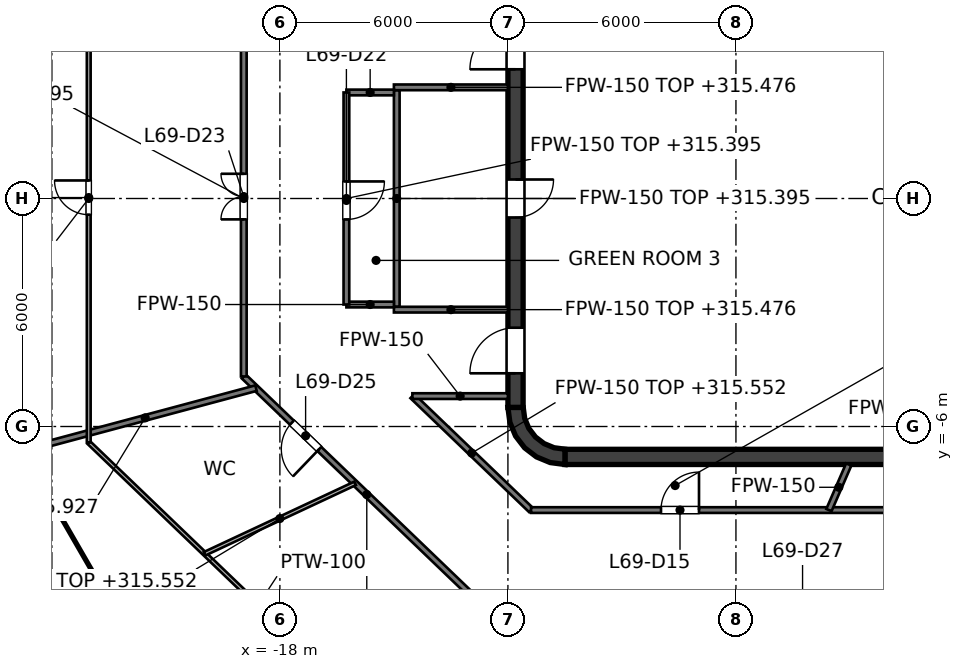
"""IFC4 building model, lengths in metres.
Left out: names, types, materials, properties, quantities, classifications, styles, units other than length and angle.
Written with IfcOpenShell. Run it as: python <this file> out.ifc"""

import sys

from ifc_helpers import new_model, si_unit, direction, frame, frame_2d, origin, place, context, subcontext, project, spatial, polyline, rectangle, outline, extrude, element, fill, save


model = new_model("IFC4")
c1 = context("Model", 3, precision=1e-05, world=origin(), true_north=direction((0.0, 1.0)))
c2 = subcontext(c1, "Body", "Model", "MODEL_VIEW")
j1 = project(units=[si_unit("LENGTHUNIT", "METRE"), si_unit("PLANEANGLEUNIT", "RADIAN")], contexts=[c1])
p1 = place(None, origin())
s1 = spatial("IfcSite", under=j1, at=p1, CompositionType="ELEMENT")
p2 = place(p1, origin())
s2 = spatial("IfcBuilding", under=s1, at=p2, CompositionType="ELEMENT")
p3 = place(p2, frame((0.0, 0.0, 312.4)))
s3 = spatial("IfcBuildingStorey", under=s2, at=p3, CompositionType="ELEMENT", Elevation=312.4)
p4 = place(p3, frame((-10.5, -6.8, 0.0), z_axis=(0.0, 0.0, 1.0), x_axis=(1.0, 0.0, 0.0)))
e1 = element("IfcWall", 1, at=p4, inside=s3, PredefinedType="SHEAR", context=c2, shape_type="SweptSolid", body=[
    extrude(rectangle(XDim=21.0, YDim=0.4, at=frame_2d((10.5, 0.0))), origin(), (0.0, 0.0, 1.0), 4.0),
])
p5 = place(p3, frame((-11.8, -5.5, 0.0), z_axis=(0.0, 0.0, 1.0), x_axis=(0.0, 1.0, 0.0)))
e2 = element("IfcWall", 2, at=p5, inside=s3, PredefinedType="SHEAR", context=c2, shape_type="SweptSolid", body=[
    extrude(rectangle(XDim=11.0, YDim=0.4, at=frame_2d((5.5, 0.0))), origin(), (0.0, 0.0, 1.0), 4.0),
])
p6 = place(p5, frame((5.0, 0.0, 0.0)))
e3 = element("IfcOpeningElement", 3, at=p6, cuts=e2, PredefinedType="OPENING", context=c2, shape_type="SweptSolid", body=[
    extrude(rectangle(XDim=1.0, YDim=2.1, at=frame_2d((0.5, 1.05))), frame((0.0, 0.2, 0.0), z_axis=(0.0, -1.0, 0.0), x_axis=(1.0, 0.0, 0.0)), (0.0, 0.0, 1.0), 0.4),
])
p7 = place(p5, frame((0.9, 0.0, 0.0)))
e4 = element("IfcOpeningElement", 4, at=p7, cuts=e2, PredefinedType="OPENING", context=c2, shape_type="SweptSolid", body=[
    extrude(rectangle(XDim=1.2, YDim=2.1, at=frame_2d((0.6, 1.05))), frame((0.0, 0.2, 0.0), z_axis=(0.0, -1.0, 0.0), x_axis=(1.0, 0.0, 0.0)), (0.0, 0.0, 1.0), 0.4),
])
p8 = place(p5, frame((8.9, 0.0, 0.0)))
e5 = element("IfcOpeningElement", 5, at=p8, cuts=e2, PredefinedType="OPENING", context=c2, shape_type="SweptSolid", body=[
    extrude(rectangle(XDim=1.2, YDim=2.1, at=frame_2d((0.6, 1.05))), frame((0.0, 0.2, 0.0), z_axis=(0.0, -1.0, 0.0), x_axis=(1.0, 0.0, 0.0)), (0.0, 0.0, 1.0), 0.4),
])
p9 = place(p3, origin())
e6 = element("IfcWall", 6, at=p9, inside=s3, PredefinedType="SHEAR", context=c2, shape_type="SweptSolid", body=[
    extrude(outline(polyline([(-10.5, -7.0), (-10.5, -6.596), (-10.784, -6.559), (-11.048, -6.45), (-11.275, -6.275), (-11.45, -6.048), (-11.559, -5.784), (-11.596, -5.5), (-12.0, -5.5), (-11.949, -5.888), (-11.799, -6.25), (-11.561, -6.561), (-11.25, -6.799), (-10.888, -6.949), (-10.5, -7.0)])), origin(), (0.0, 0.0, 1.0), 4.0),
])
p10 = place(p3, frame((-9.0, -6.6, 0.0), z_axis=(0.0, 0.0, 1.0), x_axis=(0.0, 1.0, 0.0)))
e7 = element("IfcWall", 7, at=p10, inside=s3, PredefinedType="PARTITIONING", context=c2, shape_type="SweptSolid", body=[
    extrude(rectangle(XDim=2.5, YDim=0.25, at=frame_2d((1.25, 0.0))), origin(), (0.0, 0.0, 1.0), 3.85),
])
p11 = place(p10, frame((0.75, 0.0, 0.0)))
e8 = element("IfcOpeningElement", 8, at=p11, cuts=e7, PredefinedType="OPENING", context=c2, shape_type="SweptSolid", body=[
    extrude(rectangle(XDim=1.0, YDim=2.1, at=frame_2d((0.5, 1.05))), frame((0.0, 0.125, 0.0), z_axis=(0.0, -1.0, 0.0), x_axis=(1.0, 0.0, 0.0)), (0.0, 0.0, 1.0), 0.25),
])
p12 = place(p3, frame((-2.9, -6.6, 0.0), z_axis=(0.0, 0.0, 1.0), x_axis=(0.0, 1.0, 0.0)))
e9 = element("IfcWall", 9, at=p12, inside=s3, PredefinedType="PARTITIONING", context=c2, shape_type="SweptSolid", body=[
    extrude(rectangle(XDim=2.5, YDim=0.25, at=frame_2d((1.25, 0.0))), origin(), (0.0, 0.0, 1.0), 3.85),
])
p13 = place(p12, frame((0.8, 0.0, 0.0)))
e10 = element("IfcOpeningElement", 10, at=p13, cuts=e9, PredefinedType="OPENING", context=c2, shape_type="SweptSolid", body=[
    extrude(rectangle(XDim=0.9, YDim=2.1, at=frame_2d((0.45, 1.05))), frame((0.0, 0.125, 0.0), z_axis=(0.0, -1.0, 0.0), x_axis=(1.0, 0.0, 0.0)), (0.0, 0.0, 1.0), 0.25),
])
p14 = place(p3, frame((-9.125, 1.525, 0.0), z_axis=(0.0, 0.0, 1.0), x_axis=(1.0, 0.0, 0.0)))
e11 = element("IfcWall", 11, at=p14, inside=s3, PredefinedType="SOLIDWALL", context=c2, shape_type="SweptSolid", body=[
    extrude(rectangle(XDim=8.35, YDim=0.25, at=frame_2d((4.175, 0.0))), origin(), (0.0, 0.0, 1.0), 3.85),
])
p15 = place(p14, frame((0.925, 0.0, 0.0)))
e12 = element("IfcOpeningElement", 12, at=p15, cuts=e11, PredefinedType="OPENING", context=c2, shape_type="SweptSolid", body=[
    extrude(rectangle(XDim=1.1, YDim=2.1, at=frame_2d((0.55, 1.05))), frame((0.0, 0.125, 0.0), z_axis=(0.0, -1.0, 0.0), x_axis=(1.0, 0.0, 0.0)), (0.0, 0.0, 1.0), 0.25),
])
p16 = place(p14, frame((3.625, 0.0, 0.0)))
e13 = element("IfcOpeningElement", 13, at=p16, cuts=e11, PredefinedType="OPENING", context=c2, shape_type="SweptSolid", body=[
    extrude(rectangle(XDim=1.1, YDim=2.1, at=frame_2d((0.55, 1.05))), frame((0.0, 0.125, 0.0), z_axis=(0.0, -1.0, 0.0), x_axis=(1.0, 0.0, 0.0)), (0.0, 0.0, 1.0), 0.25),
])
p17 = place(p14, frame((6.325, 0.0, 0.0)))
e14 = element("IfcOpeningElement", 14, at=p17, cuts=e11, PredefinedType="OPENING", context=c2, shape_type="SweptSolid", body=[
    extrude(rectangle(XDim=1.1, YDim=2.1, at=frame_2d((0.55, 1.05))), frame((0.0, 0.125, 0.0), z_axis=(0.0, -1.0, 0.0), x_axis=(1.0, 0.0, 0.0)), (0.0, 0.0, 1.0), 0.25),
])
for number, where, z_axis, x_axis in (
    (15, (-9.0, 1.65, 0.0), (0.0, 0.0, 1.0), (0.0, 1.0, 0.0)),
    (16, (-6.3, 1.65, 0.0), (0.0, 0.0, 1.0), (0.0, 1.0, 0.0)),
    (17, (-3.6, 1.65, 0.0), (0.0, 0.0, 1.0), (0.0, 1.0, 0.0)),
):
    element("IfcWall", number, at=place(p3, frame(where, z_axis=z_axis, x_axis=x_axis)), inside=s3, PredefinedType="SOLIDWALL", context=c2, shape_type="SweptSolid", body=[
        extrude(rectangle(XDim=2.2, YDim=0.25, at=frame_2d((1.1, 0.0))), origin(), (0.0, 0.0, 1.0), 3.85),
    ])
p18 = place(p3, frame((-9.125, -1.525, 0.0), z_axis=(0.0, 0.0, 1.0), x_axis=(1.0, 0.0, 0.0)))
e18 = element("IfcWall", 18, at=p18, inside=s3, PredefinedType="SOLIDWALL", context=c2, shape_type="SweptSolid", body=[
    extrude(rectangle(XDim=18.25, YDim=0.25, at=frame_2d((9.125, 0.0))), origin(), (0.0, 0.0, 1.0), 3.85),
])
p19 = place(p18, frame((7.15, 0.0, 0.0)))
e19 = element("IfcOpeningElement", 19, at=p19, cuts=e18, PredefinedType="OPENING", context=c2, shape_type="SweptSolid", body=[
    extrude(rectangle(XDim=1.2, YDim=2.1, at=frame_2d((0.6, 1.05))), frame((0.0, 0.125, 0.0), z_axis=(0.0, -1.0, 0.0), x_axis=(1.0, 0.0, 0.0)), (0.0, 0.0, 1.0), 0.25),
])
p20 = place(p18, frame((10.2, 0.0, 0.0)))
e20 = element("IfcOpeningElement", 20, at=p20, cuts=e18, PredefinedType="OPENING", context=c2, shape_type="SweptSolid", body=[
    extrude(rectangle(XDim=1.2, YDim=2.1, at=frame_2d((0.6, 1.05))), frame((0.0, 0.125, 0.0), z_axis=(0.0, -1.0, 0.0), x_axis=(1.0, 0.0, 0.0)), (0.0, 0.0, 1.0), 0.25),
])
p21 = place(p18, frame((16.075, 0.0, 0.0)))
e21 = element("IfcOpeningElement", 21, at=p21, cuts=e18, PredefinedType="OPENING", context=c2, shape_type="SweptSolid", body=[
    extrude(rectangle(XDim=1.0, YDim=2.1, at=frame_2d((0.5, 1.05))), frame((0.0, 0.125, 0.0), z_axis=(0.0, -1.0, 0.0), x_axis=(1.0, 0.0, 0.0)), (0.0, 0.0, 1.0), 0.25),
])
p22 = place(p3, frame((-9.125, -3.975, 0.0), z_axis=(0.0, 0.0, 1.0), x_axis=(1.0, 0.0, 0.0)))
e22 = element("IfcWall", 22, at=p22, inside=s3, PredefinedType="SOLIDWALL", context=c2, shape_type="SweptSolid", body=[
    extrude(rectangle(XDim=12.4, YDim=0.25, at=frame_2d((6.2, 0.0))), origin(), (0.0, 0.0, 1.0), 3.85),
])
p23 = place(p22, frame((1.05, 0.0, 0.0)))
e23 = element("IfcOpeningElement", 23, at=p23, cuts=e22, PredefinedType="OPENING", context=c2, shape_type="SweptSolid", body=[
    extrude(rectangle(XDim=1.2, YDim=2.1, at=frame_2d((0.6, 1.05))), frame((0.0, 0.125, 0.0), z_axis=(0.0, -1.0, 0.0), x_axis=(1.0, 0.0, 0.0)), (0.0, 0.0, 1.0), 0.25),
])
p24 = place(p22, frame((4.1, 0.0, 0.0)))
e24 = element("IfcOpeningElement", 24, at=p24, cuts=e22, PredefinedType="OPENING", context=c2, shape_type="SweptSolid", body=[
    extrude(rectangle(XDim=1.2, YDim=2.1, at=frame_2d((0.6, 1.05))), frame((0.0, 0.125, 0.0), z_axis=(0.0, -1.0, 0.0), x_axis=(1.0, 0.0, 0.0)), (0.0, 0.0, 1.0), 0.25),
])
for number, where, z_axis, x_axis in (
    (25, (-9.0, -3.85, 0.0), (0.0, 0.0, 1.0), (0.0, 1.0, 0.0)),
    (26, (-5.95, -3.85, 0.0), (0.0, 0.0, 1.0), (0.0, 1.0, 0.0)),
    (27, (-2.9, -3.85, 0.0), (0.0, 0.0, 1.0), (0.0, 1.0, 0.0)),
):
    element("IfcWall", number, at=place(p3, frame(where, z_axis=z_axis, x_axis=x_axis)), inside=s3, PredefinedType="SOLIDWALL", context=c2, shape_type="SweptSolid", body=[
        extrude(rectangle(XDim=2.2, YDim=0.25, at=frame_2d((1.1, 0.0))), origin(), (0.0, 0.0, 1.0), 3.85),
    ])
p25 = place(p3, frame((-14.925, -2.85, 0.0), z_axis=(0.0, 0.0, 1.0), x_axis=(0.0, 1.0, 0.0)))
e28 = element("IfcWall", 28, at=p25, inside=s3, PredefinedType="PARTITIONING", context=c2, shape_type="SweptSolid", body=[
    extrude(rectangle(XDim=5.7, YDim=0.15, at=frame_2d((2.85, 0.0))), origin(), (0.0, 0.0, 1.0), 2.995),
])
for number, where, z_axis, x_axis in (
    (29, (-15.0, 2.925, 0.0), (0.0, 0.0, 1.0), (1.0, 0.0, 0.0)),
    (30, (-15.0, -2.925, 0.0), (0.0, 0.0, 1.0), (1.0, 0.0, 0.0)),
):
    element("IfcWall", number, at=place(p3, frame(where, z_axis=z_axis, x_axis=x_axis)), inside=s3, PredefinedType="PARTITIONING", context=c2, shape_type="SweptSolid", body=[
        extrude(rectangle(XDim=3.0, YDim=0.15, at=frame_2d((1.5, 0.0))), origin(), (0.0, 0.0, 1.0), 3.076),
    ])
p26 = place(p3, frame((-18.95, -4.683, 0.0), z_axis=(0.0, 0.0, 1.0), x_axis=(0.721312831662, -0.692609412931, 0.0)))
e31 = element("IfcWall", 31, at=p26, inside=s3, PredefinedType="PARTITIONING", context=c2, shape_type="SweptSolid", body=[
    extrude(rectangle(XDim=8.973, YDim=0.15, at=frame_2d((4.487, 0.0))), origin(), (0.0, 0.0, 1.0), 3.076),
])
p27 = place(p26, frame((1.755, 0.0, 0.0)))
e32 = element("IfcOpeningElement", 32, at=p27, cuts=e31, PredefinedType="OPENING", context=c2, shape_type="SweptSolid", body=[
    extrude(rectangle(XDim=1.0, YDim=2.1, at=frame_2d((0.5, 1.05))), frame((0.0, 0.075, 0.0), z_axis=(0.0, -1.0, 0.0), x_axis=(1.0, 0.0, 0.0)), (0.0, 0.0, 1.0), 0.15),
])
p28 = place(p3, frame((-14.514, -5.2, 0.0), z_axis=(0.0, 0.0, 1.0), x_axis=(0.721283649967, -0.692639802704, 0.0)))
e33 = element("IfcWall", 33, at=p28, inside=s3, PredefinedType="PARTITIONING", context=c2, shape_type="SweptSolid", body=[
    extrude(rectangle(XDim=4.33, YDim=0.15, at=frame_2d((2.165, 0.0))), origin(), (0.0, 0.0, 1.0), 3.152),
])
p29 = place(p3, frame((-11.391, -8.199, 0.0), z_axis=(0.0, 0.0, 1.0), x_axis=(1.0, 0.0, 0.0)))
e34 = element("IfcWall", 34, at=p29, inside=s3, PredefinedType="PARTITIONING", context=c2, shape_type="SweptSolid", body=[
    extrude(rectangle(XDim=22.782, YDim=0.15, at=frame_2d((11.391, 0.0))), origin(), (0.0, 0.0, 1.0), 2.927),
])
p30 = place(p29, frame((3.419, 0.0, 0.0)))
e35 = element("IfcOpeningElement", 35, at=p30, cuts=e34, PredefinedType="OPENING", context=c2, shape_type="SweptSolid", body=[
    extrude(rectangle(XDim=1.0, YDim=2.1, at=frame_2d((0.5, 1.05))), frame((0.0, 0.075, 0.0), z_axis=(0.0, -1.0, 0.0), x_axis=(1.0, 0.0, 0.0)), (0.0, 0.0, 1.0), 0.15),
])
p31 = place(p29, frame((10.841, 0.0, 0.0)))
e36 = element("IfcOpeningElement", 36, at=p31, cuts=e34, PredefinedType="OPENING", context=c2, shape_type="SweptSolid", body=[
    extrude(rectangle(XDim=1.0, YDim=2.1, at=frame_2d((0.5, 1.05))), frame((0.0, 0.075, 0.0), z_axis=(0.0, -1.0, 0.0), x_axis=(1.0, 0.0, 0.0)), (0.0, 0.0, 1.0), 0.15),
])
p32 = place(p29, frame((18.363, 0.0, 0.0)))
e37 = element("IfcOpeningElement", 37, at=p32, cuts=e34, PredefinedType="OPENING", context=c2, shape_type="SweptSolid", body=[
    extrude(rectangle(XDim=1.0, YDim=2.1, at=frame_2d((0.5, 1.05))), frame((0.0, 0.075, 0.0), z_axis=(0.0, -1.0, 0.0), x_axis=(1.0, 0.0, 0.0)), (0.0, 0.0, 1.0), 0.15),
])
p33 = place(p3, frame((-14.514, -5.2, 0.0), z_axis=(0.0, 0.0, 1.0), x_axis=(1.0, 0.0, 0.0)))
e38 = element("IfcWall", 38, at=p33, inside=s3, PredefinedType="PARTITIONING", context=c2, shape_type="SweptSolid", body=[
    extrude(rectangle(XDim=2.514, YDim=0.15, at=frame_2d((1.257, 0.0))), origin(), (0.0, 0.0, 1.0), 3.85),
])
for number, where, z_axis, x_axis in (
    (39, (-16.25, -2.79, 0.0), (0.0, 0.0, 1.0), (1.0, 0.0, 0.0)),
    (40, (-16.25, 2.79, 0.0), (0.0, 0.0, 1.0), (1.0, 0.0, 0.0)),
):
    element("IfcWall", number, at=place(p3, frame(where, z_axis=z_axis, x_axis=x_axis)), inside=s3, PredefinedType="PARTITIONING", context=c2, shape_type="SweptSolid", body=[
        extrude(rectangle(XDim=1.25, YDim=0.15, at=frame_2d((0.625, 0.0))), origin(), (0.0, 0.0, 1.0), 3.85),
    ])
p34 = place(p3, frame((-24.461, -6.554, 0.0), z_axis=(0.0, 0.0, 1.0), x_axis=(0.965890459785, 0.258950998638, 0.0)))
e41 = element("IfcWall", 41, at=p34, inside=s3, PredefinedType="PARTITIONING", context=c2, shape_type="SweptSolid", body=[
    extrude(rectangle(XDim=6.038, YDim=0.15, at=frame_2d((3.019, 0.0))), origin(), (0.0, 0.0, 1.0), 3.527),
])
p35 = place(p3, frame((-3.553, -8.199, 0.0), z_axis=(0.0, 0.0, 1.0), x_axis=(0.397906243356, 0.917426085033, 0.0)))
e42 = element("IfcWall", 42, at=p35, inside=s3, PredefinedType="PARTITIONING", context=c2, shape_type="SweptSolid", body=[
    extrude(rectangle(XDim=1.307, YDim=0.15, at=frame_2d((0.653, 0.0))), origin(), (0.0, 0.0, 1.0), 3.85),
])
p36 = place(p3, frame((-16.25, -2.79, 0.0), z_axis=(0.0, 0.0, 1.0), x_axis=(0.0, 1.0, 0.0)))
e43 = element("IfcWall", 43, at=p36, inside=s3, PredefinedType="PARTITIONING", context=c2, shape_type="SweptSolid", body=[
    extrude(rectangle(XDim=5.58, YDim=0.15, at=frame_2d((2.79, 0.0))), origin(), (0.0, 0.0, 1.0), 2.995),
])
p37 = place(p36, frame((2.239, 0.0, 0.0)))
e44 = element("IfcOpeningElement", 44, at=p37, cuts=e43, PredefinedType="OPENING", context=c2, shape_type="SweptSolid", body=[
    extrude(rectangle(XDim=1.0, YDim=2.1, at=frame_2d((0.5, 1.05))), frame((0.0, 0.075, 0.0), z_axis=(0.0, -1.0, 0.0), x_axis=(1.0, 0.0, 0.0)), (0.0, 0.0, 1.0), 0.15),
])
p38 = place(p3, frame((-18.95, -4.683, 0.0), z_axis=(0.0, 0.0, 1.0), x_axis=(0.0, 1.0, 0.0)))
e45 = element("IfcWall", 45, at=p38, inside=s3, PredefinedType="PARTITIONING", context=c2, shape_type="SweptSolid", body=[
    extrude(rectangle(XDim=9.366, YDim=0.15, at=frame_2d((4.683, 0.0))), origin(), (0.0, 0.0, 1.0), 2.995),
])
p39 = place(p38, frame((4.134, 0.0, 0.0)))
e46 = element("IfcOpeningElement", 46, at=p39, cuts=e45, PredefinedType="OPENING", context=c2, shape_type="SweptSolid", body=[
    extrude(rectangle(XDim=1.2, YDim=2.1, at=frame_2d((0.6, 1.05))), frame((0.0, 0.075, 0.0), z_axis=(0.0, -1.0, 0.0), x_axis=(1.0, 0.0, 0.0)), (0.0, 0.0, 1.0), 0.15),
])
p40 = place(p3, frame((-23.03, -6.421, 0.0), z_axis=(0.0, 0.0, 1.0), x_axis=(0.721337166522, -0.692584068684, 0.0)))
e47 = element("IfcWall", 47, at=p40, inside=s3, PredefinedType="PARTITIONING", context=c2, shape_type="SweptSolid", body=[
    extrude(rectangle(XDim=12.354, YDim=0.1, at=frame_2d((6.177, 0.0))), origin(), (0.0, 0.0, 1.0), 2.995),
])
p41 = place(p40, frame((7.843, 0.0, 0.0)))
e48 = element("IfcOpeningElement", 48, at=p41, cuts=e47, PredefinedType="OPENING", context=c2, shape_type="SweptSolid", body=[
    extrude(rectangle(XDim=0.9, YDim=2.1, at=frame_2d((0.45, 1.05))), frame((0.0, 0.05, 0.0), z_axis=(0.0, -1.0, 0.0), x_axis=(1.0, 0.0, 0.0)), (0.0, 0.0, 1.0), 0.1),
])
p42 = place(p3, frame((-19.982, -9.349, 0.0), z_axis=(0.0, 0.0, 1.0), x_axis=(0.905780511999, 0.42374717, 0.0)))
e49 = element("IfcWall", 49, at=p42, inside=s3, PredefinedType="PARTITIONING", context=c2, shape_type="SweptSolid", body=[
    extrude(rectangle(XDim=4.373, YDim=0.1, at=frame_2d((2.187, 0.0))), origin(), (0.0, 0.0, 1.0), 3.152),
])
p43 = place(p3, frame((-23.03, -6.421, 0.0), z_axis=(0.0, 0.0, 1.0), x_axis=(0.0, 1.0, 0.0)))
e50 = element("IfcWall", 50, at=p43, inside=s3, PredefinedType="PARTITIONING", context=c2, shape_type="SweptSolid", body=[
    extrude(rectangle(XDim=12.842, YDim=0.1, at=frame_2d((6.421, 0.0))), origin(), (0.0, 0.0, 1.0), 2.995),
])
p44 = place(p43, frame((5.996, 0.0, 0.0)))
e51 = element("IfcOpeningElement", 51, at=p44, cuts=e50, PredefinedType="OPENING", context=c2, shape_type="SweptSolid", body=[
    extrude(rectangle(XDim=0.9, YDim=2.1, at=frame_2d((0.45, 1.05))), frame((0.0, 0.05, 0.0), z_axis=(0.0, -1.0, 0.0), x_axis=(1.0, 0.0, 0.0)), (0.0, 0.0, 1.0), 0.1),
])
p45 = place(p15, origin())
e52 = element("IfcDoor", 52, at=p45, inside=s3, OperationType="DOUBLE_DOOR_SLIDING", PredefinedType="DOOR", context=c2, shape_type="SweptSolid", body=[
    extrude(rectangle(XDim=1.1, YDim=2.1, at=frame_2d((0.55, 1.05))), frame((0.0, 0.025, 0.0), z_axis=(0.0, -1.0, 0.0), x_axis=(1.0, 0.0, 0.0)), (0.0, 0.0, 1.0), 0.05),
])
fill(e12, e52)
p46 = place(p16, origin())
e53 = element("IfcDoor", 53, at=p46, inside=s3, OperationType="DOUBLE_DOOR_SLIDING", PredefinedType="DOOR", context=c2, shape_type="SweptSolid", body=[
    extrude(rectangle(XDim=1.1, YDim=2.1, at=frame_2d((0.55, 1.05))), frame((0.0, 0.025, 0.0), z_axis=(0.0, -1.0, 0.0), x_axis=(1.0, 0.0, 0.0)), (0.0, 0.0, 1.0), 0.05),
])
fill(e13, e53)
p47 = place(p17, origin())
e54 = element("IfcDoor", 54, at=p47, inside=s3, OperationType="DOUBLE_DOOR_SLIDING", PredefinedType="DOOR", context=c2, shape_type="SweptSolid", body=[
    extrude(rectangle(XDim=1.1, YDim=2.1, at=frame_2d((0.55, 1.05))), frame((0.0, 0.025, 0.0), z_axis=(0.0, -1.0, 0.0), x_axis=(1.0, 0.0, 0.0)), (0.0, 0.0, 1.0), 0.05),
])
fill(e14, e54)
p48 = place(p23, origin())
e55 = element("IfcDoor", 55, at=p48, inside=s3, OperationType="DOUBLE_DOOR_SLIDING", PredefinedType="DOOR", context=c2, shape_type="SweptSolid", body=[
    extrude(rectangle(XDim=1.2, YDim=2.1, at=frame_2d((0.6, 1.05))), frame((0.0, 0.025, 0.0), z_axis=(0.0, -1.0, 0.0), x_axis=(1.0, 0.0, 0.0)), (0.0, 0.0, 1.0), 0.05),
])
fill(e23, e55)
p49 = place(p24, origin())
e56 = element("IfcDoor", 56, at=p49, inside=s3, OperationType="DOUBLE_DOOR_SLIDING", PredefinedType="DOOR", context=c2, shape_type="SweptSolid", body=[
    extrude(rectangle(XDim=1.2, YDim=2.1, at=frame_2d((0.6, 1.05))), frame((0.0, 0.025, 0.0), z_axis=(0.0, -1.0, 0.0), x_axis=(1.0, 0.0, 0.0)), (0.0, 0.0, 1.0), 0.05),
])
fill(e24, e56)
p50 = place(p11, origin())
e57 = element("IfcDoor", 57, at=p50, inside=s3, OperationType="SINGLE_SWING_LEFT", PredefinedType="DOOR", context=c2, shape_type="SweptSolid", body=[
    extrude(rectangle(XDim=1.0, YDim=2.1, at=frame_2d((0.5, 1.05))), frame((0.0, 0.025, 0.0), z_axis=(0.0, -1.0, 0.0), x_axis=(1.0, 0.0, 0.0)), (0.0, 0.0, 1.0), 0.05),
])
fill(e8, e57)
p51 = place(p13, origin())
e58 = element("IfcDoor", 58, at=p51, inside=s3, OperationType="SINGLE_SWING_RIGHT", PredefinedType="DOOR", context=c2, shape_type="SweptSolid", body=[
    extrude(rectangle(XDim=0.9, YDim=2.1, at=frame_2d((0.45, 1.05))), frame((0.0, 0.025, 0.0), z_axis=(0.0, -1.0, 0.0), x_axis=(1.0, 0.0, 0.0)), (0.0, 0.0, 1.0), 0.05),
])
fill(e10, e58)
p52 = place(p6, origin())
e59 = element("IfcDoor", 59, at=p52, inside=s3, OperationType="SINGLE_SWING_RIGHT", PredefinedType="DOOR", context=c2, shape_type="SweptSolid", body=[
    extrude(rectangle(XDim=1.0, YDim=2.1, at=frame_2d((0.5, 1.05))), frame((0.0, 0.025, 0.0), z_axis=(0.0, -1.0, 0.0), x_axis=(1.0, 0.0, 0.0)), (0.0, 0.0, 1.0), 0.05),
])
fill(e3, e59)
p53 = place(p7, origin())
e60 = element("IfcDoor", 60, at=p53, inside=s3, OperationType="SINGLE_SWING_LEFT", PredefinedType="DOOR", context=c2, shape_type="SweptSolid", body=[
    extrude(rectangle(XDim=1.2, YDim=2.1, at=frame_2d((0.6, 1.05))), frame((0.0, 0.025, 0.0), z_axis=(0.0, -1.0, 0.0), x_axis=(1.0, 0.0, 0.0)), (0.0, 0.0, 1.0), 0.05),
])
fill(e4, e60)
p54 = place(p8, origin())
e61 = element("IfcDoor", 61, at=p54, inside=s3, OperationType="SINGLE_SWING_LEFT", PredefinedType="DOOR", context=c2, shape_type="SweptSolid", body=[
    extrude(rectangle(XDim=1.2, YDim=2.1, at=frame_2d((0.6, 1.05))), frame((0.0, 0.025, 0.0), z_axis=(0.0, -1.0, 0.0), x_axis=(1.0, 0.0, 0.0)), (0.0, 0.0, 1.0), 0.05),
])
fill(e5, e61)
p55 = place(p30, origin())
e62 = element("IfcDoor", 62, at=p55, inside=s3, OperationType="SINGLE_SWING_RIGHT", PredefinedType="DOOR", context=c2, shape_type="SweptSolid", body=[
    extrude(rectangle(XDim=1.0, YDim=2.1, at=frame_2d((0.5, 1.05))), frame((0.0, 0.025, 0.0), z_axis=(0.0, -1.0, 0.0), x_axis=(1.0, 0.0, 0.0)), (0.0, 0.0, 1.0), 0.05),
])
fill(e35, e62)
p56 = place(p37, origin())
e63 = element("IfcDoor", 63, at=p56, inside=s3, OperationType="SINGLE_SWING_RIGHT", PredefinedType="DOOR", context=c2, shape_type="SweptSolid", body=[
    extrude(rectangle(XDim=1.0, YDim=2.1, at=frame_2d((0.5, 1.05))), frame((0.0, 0.025, 0.0), z_axis=(0.0, -1.0, 0.0), x_axis=(1.0, 0.0, 0.0)), (0.0, 0.0, 1.0), 0.05),
])
fill(e44, e63)
p57 = place(p39, origin())
e64 = element("IfcDoor", 64, at=p57, inside=s3, OperationType="DOUBLE_DOOR_SINGLE_SWING", PredefinedType="DOOR", context=c2, shape_type="SweptSolid", body=[
    extrude(rectangle(XDim=1.2, YDim=2.1, at=frame_2d((0.6, 1.05))), frame((0.0, 0.025, 0.0), z_axis=(0.0, -1.0, 0.0), x_axis=(1.0, 0.0, 0.0)), (0.0, 0.0, 1.0), 0.05),
])
fill(e46, e64)
p58 = place(p44, origin())
e65 = element("IfcDoor", 65, at=p58, inside=s3, OperationType="SINGLE_SWING_RIGHT", PredefinedType="DOOR", context=c2, shape_type="SweptSolid", body=[
    extrude(rectangle(XDim=0.9, YDim=2.1, at=frame_2d((0.45, 1.05))), frame((0.0, 0.025, 0.0), z_axis=(0.0, -1.0, 0.0), x_axis=(1.0, 0.0, 0.0)), (0.0, 0.0, 1.0), 0.05),
])
fill(e51, e65)
p59 = place(p27, origin())
e66 = element("IfcDoor", 66, at=p59, inside=s3, OperationType="SINGLE_SWING_RIGHT", PredefinedType="DOOR", context=c2, shape_type="SweptSolid", body=[
    extrude(rectangle(XDim=1.0, YDim=2.1, at=frame_2d((0.5, 1.05))), frame((0.0, 0.025, 0.0), z_axis=(0.0, -1.0, 0.0), x_axis=(1.0, 0.0, 0.0)), (0.0, 0.0, 1.0), 0.05),
])
fill(e32, e66)
save(model, sys.argv[1])
